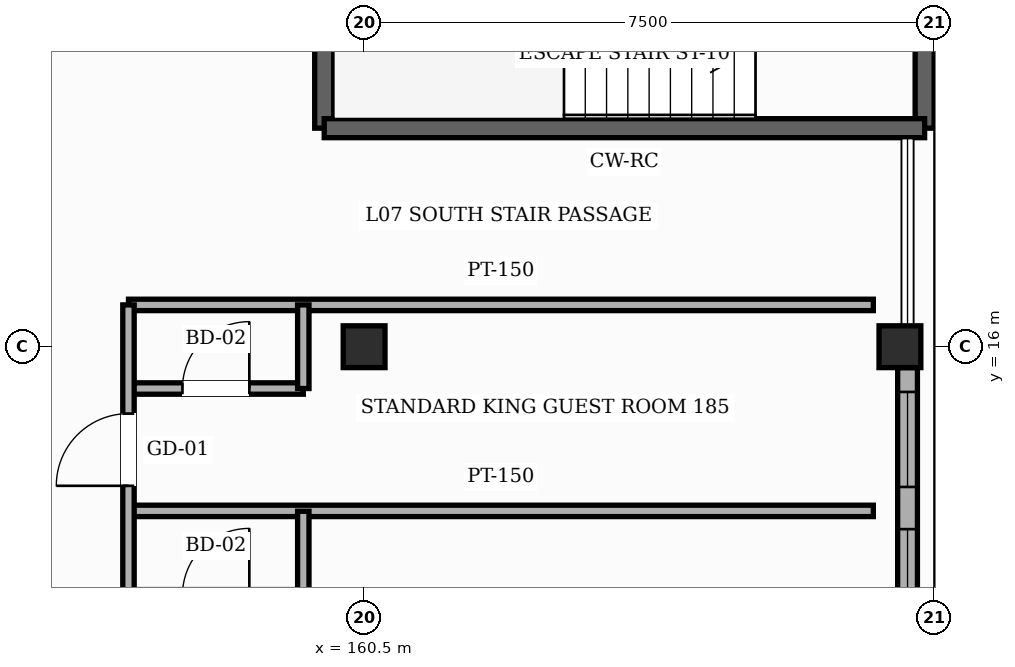
"""IFC4 building model, lengths in metres.
Left out: names, types, materials, properties, quantities, classifications, styles, units other than length and angle.
Written with IfcOpenShell. Run it as: python <this file> out.ifc"""

import sys

from ifc_helpers import new_model, si_unit, direction, frame, frame_2d, origin, origin_2d, place, context, subcontext, project, spatial, rectangle, hollow_rectangle, extrude, element, fill, save


model = new_model("IFC4")
c1 = context("Model", 3, precision=1e-05, world=origin(), true_north=direction((0.0, 1.0)))
c2 = subcontext(c1, "Body", "Model", "MODEL_VIEW")
j1 = project(units=[si_unit("LENGTHUNIT", "METRE"), si_unit("PLANEANGLEUNIT", "RADIAN")], contexts=[c1])
p1 = place(None, origin())
s1 = spatial("IfcSite", under=j1, at=p1, CompositionType="ELEMENT")
p2 = place(p1, origin())
s2 = spatial("IfcBuilding", under=s1, at=p2, CompositionType="ELEMENT")
p3 = place(p2, frame((0.0, 0.0, 31.8)))
s3 = spatial("IfcBuildingStorey", under=s2, at=p3, CompositionType="ELEMENT", Elevation=31.8)
for number, where, z_axis, x_axis in (
    (1, (160.5, 16.0, 0.0), (0.0, 0.0, 1.0), (1.0, 0.0, 0.0)),
    (2, (167.55, 16.0, 0.0), (0.0, 0.0, 1.0), (1.0, 0.0, 0.0)),
):
    element("IfcColumn", number, at=place(p3, frame(where, z_axis=z_axis, x_axis=x_axis)), inside=s3, PredefinedType="COLUMN", context=c2, shape_type="SweptSolid", body=[
        extrude(hollow_rectangle(XDim=0.55, YDim=0.55, WallThickness=0.022, InnerFilletRadius=0.022, OuterFilletRadius=0.044, at=origin_2d()), origin(), (0.0, 0.0, 1.0), 3.6),
    ])
p4 = place(p3, frame((167.65, 15.725, 0.0), z_axis=(0.0, 0.0, 1.0), x_axis=(0.0, -1.0, 0.0)))
e3 = element("IfcWall", 3, at=p4, inside=s3, PredefinedType="SOLIDWALL", context=c2, shape_type="SweptSolid", body=[
    extrude(rectangle(XDim=7.45, YDim=0.26, at=frame_2d((3.725, 0.0))), origin(), (0.0, 0.0, 1.0), 2.755),
])
p5 = place(p4, frame((4.99, 0.0, 0.85)))
e4 = element("IfcOpeningElement", 4, at=p5, cuts=e3, PredefinedType="OPENING", context=c2, shape_type="SweptSolid", body=[
    extrude(rectangle(XDim=1.95, YDim=1.35, at=frame_2d((0.975, 0.675))), frame((0.0, 0.14, 0.0), z_axis=(0.0, -1.0, 0.0), x_axis=(1.0, 0.0, 0.0)), (0.0, 0.0, 1.0), 0.28),
])
p6 = place(p4, frame((2.125, 0.0, 0.85)))
e5 = element("IfcOpeningElement", 5, at=p6, cuts=e3, PredefinedType="OPENING", context=c2, shape_type="SweptSolid", body=[
    extrude(rectangle(XDim=2.25, YDim=1.35, at=frame_2d((1.125, 0.675))), frame((0.0, 0.14, 0.0), z_axis=(0.0, -1.0, 0.0), x_axis=(1.0, 0.0, 0.0)), (0.0, 0.0, 1.0), 0.28),
])
p7 = place(p4, frame((0.32, 0.0, 0.85)))
e6 = element("IfcOpeningElement", 6, at=p7, cuts=e3, PredefinedType="OPENING", context=c2, shape_type="SweptSolid", body=[
    extrude(rectangle(XDim=1.25, YDim=1.5, at=frame_2d((0.625, 0.75))), frame((0.0, 0.14, 0.0), z_axis=(0.0, -1.0, 0.0), x_axis=(1.0, 0.0, 0.0)), (0.0, 0.0, 1.0), 0.28),
])
for number, where, z_axis, x_axis in (
    (7, (167.875, 22.225, 0.0), (0.0, 0.0, 1.0), (0.0, -1.0, 0.0)),
    (8, (159.975, 18.875, 0.0), (0.0, 0.0, 1.0), (0.0, 1.0, 0.0)),
):
    element("IfcWall", number, at=place(p3, frame(where, z_axis=z_axis, x_axis=x_axis)), inside=s3, PredefinedType="SHEAR", context=c2, shape_type="SweptSolid", body=[
        extrude(rectangle(XDim=3.35, YDim=0.25, at=frame_2d((1.675, 0.0))), origin(), (0.0, 0.0, 1.0), 3.38),
    ])
p8 = place(p3, frame((167.875, 18.875, 0.0), z_axis=(0.0, 0.0, 1.0), x_axis=(-1.0, 0.0, 0.0)))
e9 = element("IfcWall", 9, at=p8, inside=s3, PredefinedType="SHEAR", context=c2, shape_type="SweptSolid", body=[
    extrude(rectangle(XDim=7.9, YDim=0.25, at=frame_2d((3.95, 0.0))), origin(), (0.0, 0.0, 1.0), 3.38),
])
p9 = place(p3, frame((157.4, 13.84, 0.0), z_axis=(0.0, 0.0, 1.0), x_axis=(1.0, 0.0, 0.0)))
e10 = element("IfcWall", 10, at=p9, inside=s3, PredefinedType="PARTITIONING", context=c2, shape_type="SweptSolid", body=[
    extrude(rectangle(XDim=9.8, YDim=0.15, at=frame_2d((4.9, 0.0))), origin(), (0.0, 0.0, 1.0), 3.365),
])
p10 = place(p3, frame((157.4, 15.45, 0.0), z_axis=(0.0, 0.0, 1.0), x_axis=(1.0, 0.0, 0.0)))
e11 = element("IfcWall", 11, at=p10, inside=s3, PredefinedType="PARTITIONING", context=c2, shape_type="SweptSolid", body=[
    extrude(rectangle(XDim=2.3, YDim=0.15, at=frame_2d((1.15, 0.0))), origin(), (0.0, 0.0, 1.0), 3.365),
])
p11 = place(p10, frame((0.71, 0.0, 0.0)))
e12 = element("IfcOpeningElement", 12, at=p11, cuts=e11, PredefinedType="OPENING", context=c2, shape_type="SweptSolid", body=[
    extrude(rectangle(XDim=0.88, YDim=2.12, at=frame_2d((0.44, 1.06))), frame((0.0, 0.085, 0.0), z_axis=(0.0, -1.0, 0.0), x_axis=(1.0, 0.0, 0.0)), (0.0, 0.0, 1.0), 0.17),
])
p12 = place(p3, frame((157.4, 16.55, 0.0), z_axis=(0.0, 0.0, 1.0), x_axis=(1.0, 0.0, 0.0)))
e13 = element("IfcWall", 13, at=p12, inside=s3, PredefinedType="PARTITIONING", context=c2, shape_type="SweptSolid", body=[
    extrude(rectangle(XDim=9.8, YDim=0.15, at=frame_2d((4.9, 0.0))), origin(), (0.0, 0.0, 1.0), 3.365),
])
p13 = place(p3, frame((157.4, 8.4, 0.0), z_axis=(0.0, 0.0, 1.0), x_axis=(0.0, 1.0, 0.0)))
e14 = element("IfcWall", 14, at=p13, inside=s3, PredefinedType="PARTITIONING", context=c2, shape_type="SweptSolid", body=[
    extrude(rectangle(XDim=8.15, YDim=0.15, at=frame_2d((4.075, 0.0))), origin(), (0.0, 0.0, 1.0), 3.365),
])
p14 = place(p13, frame((0.33, 0.0, 0.0)))
e15 = element("IfcOpeningElement", 15, at=p14, cuts=e14, PredefinedType="OPENING", context=c2, shape_type="SweptSolid", body=[
    extrude(rectangle(XDim=0.95, YDim=2.15, at=frame_2d((0.475, 1.075))), frame((0.0, 0.085, 0.0), z_axis=(0.0, -1.0, 0.0), x_axis=(1.0, 0.0, 0.0)), (0.0, 0.0, 1.0), 0.17),
])
p15 = place(p13, frame((3.05, 0.0, 0.0)))
e16 = element("IfcOpeningElement", 16, at=p15, cuts=e14, PredefinedType="OPENING", context=c2, shape_type="SweptSolid", body=[
    extrude(rectangle(XDim=0.95, YDim=2.15, at=frame_2d((0.475, 1.075))), frame((0.0, 0.085, 0.0), z_axis=(0.0, -1.0, 0.0), x_axis=(1.0, 0.0, 0.0)), (0.0, 0.0, 1.0), 0.17),
])
p16 = place(p13, frame((5.77, 0.0, 0.0)))
e17 = element("IfcOpeningElement", 17, at=p16, cuts=e14, PredefinedType="OPENING", context=c2, shape_type="SweptSolid", body=[
    extrude(rectangle(XDim=0.95, YDim=2.15, at=frame_2d((0.475, 1.075))), frame((0.0, 0.085, 0.0), z_axis=(0.0, -1.0, 0.0), x_axis=(1.0, 0.0, 0.0)), (0.0, 0.0, 1.0), 0.17),
])
p17 = place(p3, frame((159.7, 12.735, 0.0), z_axis=(0.0, 0.0, 1.0), x_axis=(0.0, 1.0, 0.0)))
e18 = element("IfcWall", 18, at=p17, inside=s3, PredefinedType="PARTITIONING", context=c2, shape_type="SweptSolid", body=[
    extrude(rectangle(XDim=1.1, YDim=0.15, at=frame_2d((0.55, 0.0))), origin(), (0.0, 0.0, 1.0), 3.365),
])
p18 = place(p3, frame((159.7, 15.45, 0.0), z_axis=(0.0, 0.0, 1.0), x_axis=(0.0, 1.0, 0.0)))
e19 = element("IfcWall", 19, at=p18, inside=s3, PredefinedType="PARTITIONING", context=c2, shape_type="SweptSolid", body=[
    extrude(rectangle(XDim=1.1, YDim=0.15, at=frame_2d((0.55, 0.0))), origin(), (0.0, 0.0, 1.0), 3.365),
])
p19 = place(p6, origin())
e20 = element("IfcWindow", 20, at=p19, inside=s3, PartitioningType="SINGLE_PANEL", PredefinedType="WINDOW", context=c2, shape_type="SweptSolid", body=[
    extrude(rectangle(XDim=2.25, YDim=1.35, at=frame_2d((1.125, 0.675))), frame((0.0, 0.03, 0.0), z_axis=(0.0, -1.0, 0.0), x_axis=(1.0, 0.0, 0.0)), (0.0, 0.0, 1.0), 0.06),
])
fill(e5, e20)
p20 = place(p7, origin())
e21 = element("IfcWindow", 21, at=p20, inside=s3, PartitioningType="SINGLE_PANEL", PredefinedType="WINDOW", context=c2, shape_type="SweptSolid", body=[
    extrude(rectangle(XDim=1.25, YDim=1.5, at=frame_2d((0.625, 0.75))), frame((0.0, 0.03, 0.0), z_axis=(0.0, -1.0, 0.0), x_axis=(1.0, 0.0, 0.0)), (0.0, 0.0, 1.0), 0.06),
])
fill(e6, e21)
p21 = place(p16, origin())
e22 = element("IfcDoor", 22, at=p21, inside=s3, OperationType="SINGLE_SWING_LEFT", PredefinedType="DOOR", context=c2, shape_type="SweptSolid", body=[
    extrude(rectangle(XDim=0.95, YDim=2.15, at=frame_2d((0.475, 1.075))), frame((0.0, 0.025, 0.0), z_axis=(0.0, -1.0, 0.0), x_axis=(1.0, 0.0, 0.0)), (0.0, 0.0, 1.0), 0.05),
])
fill(e17, e22)
p22 = place(p11, origin())
e23 = element("IfcDoor", 23, at=p22, inside=s3, OperationType="SINGLE_SWING_RIGHT", PredefinedType="DOOR", context=c2, shape_type="SweptSolid", body=[
    extrude(rectangle(XDim=0.88, YDim=2.12, at=frame_2d((0.44, 1.06))), frame((0.0, 0.025, 0.0), z_axis=(0.0, -1.0, 0.0), x_axis=(1.0, 0.0, 0.0)), (0.0, 0.0, 1.0), 0.05),
])
fill(e12, e23)
save(model, sys.argv[1])
